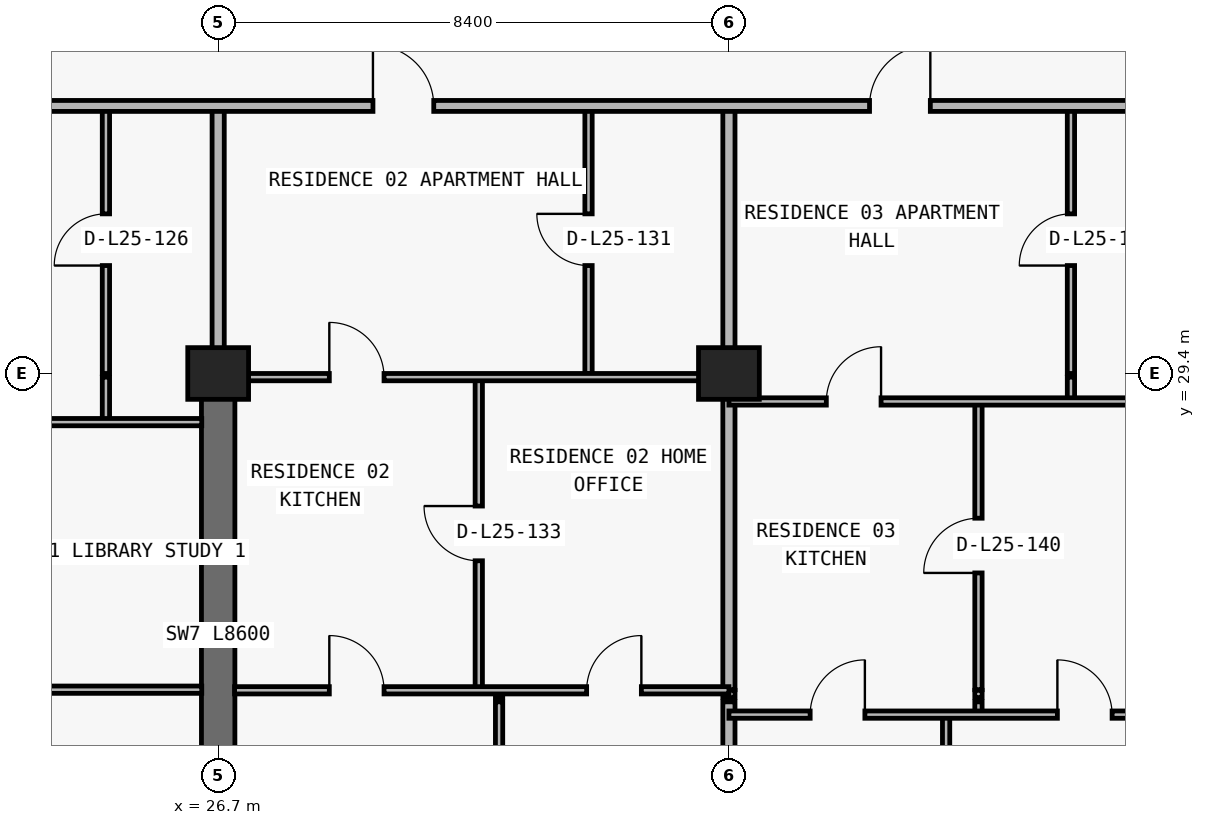
"""IFC4 building model, lengths in metres.
Left out: names, types, materials, properties, quantities, classifications, styles, units other than length and angle.
Written with IfcOpenShell. Run it as: python <this file> out.ifc"""

import sys

from ifc_helpers import new_model, si_unit, direction, frame, frame_2d, origin, origin_2d, place, context, subcontext, project, spatial, rectangle, extrude, element, fill, save


model = new_model("IFC4")
c1 = context("Model", 3, precision=1e-05, world=origin(), true_north=direction((0.0, 1.0)))
c2 = subcontext(c1, "Body", "Model", "MODEL_VIEW")
j1 = project(units=[si_unit("LENGTHUNIT", "METRE"), si_unit("PLANEANGLEUNIT", "RADIAN")], contexts=[c1])
p1 = place(None, origin())
s1 = spatial("IfcSite", under=j1, at=p1, CompositionType="ELEMENT")
p2 = place(p1, origin())
s2 = spatial("IfcBuilding", under=s1, at=p2, CompositionType="ELEMENT")
p3 = place(p2, frame((0.0, 0.0, 94.5)))
s3 = spatial("IfcBuildingStorey", under=s2, at=p3, CompositionType="ELEMENT", Elevation=94.5)
for number, where, z_axis, x_axis in (
    (1, (26.7, 29.4, 0.0), (0.0, 0.0, 1.0), (1.0, 0.0, 0.0)),
    (2, (35.1, 29.4, 0.0), (0.0, 0.0, 1.0), (1.0, 0.0, 0.0)),
):
    element("IfcColumn", number, at=place(p3, frame(where, z_axis=z_axis, x_axis=x_axis)), inside=s3, PredefinedType="COLUMN", context=c2, shape_type="SweptSolid", body=[
        extrude(rectangle(XDim=1.0, YDim=0.85, at=origin_2d()), origin(), (0.0, 0.0, 1.0), 3.0),
    ])
p4 = place(p3, frame((26.7, 20.8, 0.0), z_axis=(0.0, 0.0, 1.0), x_axis=(0.0, 1.0, 0.0)))
e3 = element("IfcWall", 3, at=p4, inside=s3, PredefinedType="SHEAR", context=c2, shape_type="SweptSolid", body=[
    extrude(rectangle(XDim=8.6, YDim=0.55, at=frame_2d((4.3, 0.0))), origin(), (0.0, 0.0, 1.0), 3.0),
])
p5 = place(p3, frame((24.854, 28.6, 0.0), z_axis=(0.0, 0.0, 1.0), x_axis=(0.0, 1.0, 0.0)))
e4 = element("IfcWall", 4, at=p5, inside=s3, PredefinedType="PARTITIONING", context=c2, shape_type="SweptSolid", body=[
    extrude(rectangle(XDim=0.74, YDim=0.12, at=frame_2d((0.37, 0.0))), origin(), (0.0, 0.0, 1.0), 2.629),
])
p6 = place(p3, frame((24.854, 29.4, 0.0), z_axis=(0.0, 0.0, 1.0), x_axis=(0.0, 1.0, 0.0)))
e5 = element("IfcWall", 5, at=p6, inside=s3, PredefinedType="PARTITIONING", context=c2, shape_type="SweptSolid", body=[
    extrude(rectangle(XDim=4.4, YDim=0.12, at=frame_2d((2.2, 0.0))), origin(), (0.0, 0.0, 1.0), 3.0),
])
p7 = place(p6, frame((1.775, 0.0, 0.0)))
e6 = element("IfcOpeningElement", 6, at=p7, cuts=e5, PredefinedType="OPENING", context=c2, shape_type="SweptSolid", body=[
    extrude(rectangle(XDim=0.85, YDim=2.1, at=frame_2d((0.425, 1.05))), frame((0.0, 0.07, 0.0), z_axis=(0.0, -1.0, 0.0), x_axis=(1.0, 0.0, 0.0)), (0.0, 0.0, 1.0), 0.14),
])
p8 = place(p3, frame((26.7, 29.405, 0.0), z_axis=(0.0, 0.0, 1.0), x_axis=(0.0, 1.0, 0.0)))
e7 = element("IfcWall", 7, at=p8, inside=s3, PredefinedType="PARTITIONING", context=c2, shape_type="SweptSolid", body=[
    extrude(rectangle(XDim=4.395, YDim=0.2, at=frame_2d((2.198, 0.0))), origin(), (0.0, 0.0, 1.0), 2.285),
])
p9 = place(p3, frame((30.986, 24.2, 0.0), z_axis=(0.0, 0.0, 1.0), x_axis=(0.0, 1.0, 0.0)))
e8 = element("IfcWall", 8, at=p9, inside=s3, PredefinedType="PARTITIONING", context=c2, shape_type="SweptSolid", body=[
    extrude(rectangle(XDim=5.14, YDim=0.12, at=frame_2d((2.57, 0.0))), origin(), (0.0, 0.0, 1.0), 2.436),
])
p10 = place(p9, frame((2.12, 0.0, 0.0)))
e9 = element("IfcOpeningElement", 9, at=p10, cuts=e8, PredefinedType="OPENING", context=c2, shape_type="SweptSolid", body=[
    extrude(rectangle(XDim=0.9, YDim=2.15, at=frame_2d((0.45, 1.075))), frame((0.0, 0.07, 0.0), z_axis=(0.0, -1.0, 0.0), x_axis=(1.0, 0.0, 0.0)), (0.0, 0.0, 1.0), 0.14),
])
p11 = place(p3, frame((31.32, 8.84, 0.0), z_axis=(0.0, 0.0, 1.0), x_axis=(0.0, 1.0, 0.0)))
e10 = element("IfcWall", 10, at=p11, inside=s3, PredefinedType="PARTITIONING", context=c2, shape_type="SweptSolid", body=[
    extrude(rectangle(XDim=15.16, YDim=0.12, at=frame_2d((7.58, 0.0))), origin(), (0.0, 0.0, 1.0), 3.0),
])
p12 = place(p3, frame((31.32, 24.07, 0.0), z_axis=(0.0, 0.0, 1.0), x_axis=(0.0, 1.0, 0.0)))
e11 = element("IfcWall", 11, at=p12, inside=s3, PredefinedType="PARTITIONING", context=c2, shape_type="SweptSolid", body=[
    extrude(rectangle(XDim=0.12, YDim=0.12, at=frame_2d((0.06, 0.0))), origin(), (0.0, 0.0, 1.0), 3.0),
])
p13 = place(p3, frame((32.791, 29.4, 0.0), z_axis=(0.0, 0.0, 1.0), x_axis=(0.0, 1.0, 0.0)))
e12 = element("IfcWall", 12, at=p13, inside=s3, PredefinedType="PARTITIONING", context=c2, shape_type="SweptSolid", body=[
    extrude(rectangle(XDim=4.4, YDim=0.12, at=frame_2d((2.2, 0.0))), origin(), (0.0, 0.0, 1.0), 3.0),
])
p14 = place(p13, frame((1.775, 0.0, 0.0)))
e13 = element("IfcOpeningElement", 13, at=p14, cuts=e12, PredefinedType="OPENING", context=c2, shape_type="SweptSolid", body=[
    extrude(rectangle(XDim=0.85, YDim=2.1, at=frame_2d((0.425, 1.05))), frame((0.0, 0.07, 0.0), z_axis=(0.0, -1.0, 0.0), x_axis=(1.0, 0.0, 0.0)), (0.0, 0.0, 1.0), 0.14),
])
p15 = place(p3, frame((35.1, 8.84, 0.0), z_axis=(0.0, 0.0, 1.0), x_axis=(0.0, 1.0, 0.0)))
e14 = element("IfcWall", 14, at=p15, inside=s3, PredefinedType="PARTITIONING", context=c2, shape_type="SweptSolid", body=[
    extrude(rectangle(XDim=15.16, YDim=0.2, at=frame_2d((7.58, 0.0))), origin(), (0.0, 0.0, 1.0), 2.124),
])
p16 = place(p3, frame((35.1, 24.07, 0.0), z_axis=(0.0, 0.0, 1.0), x_axis=(0.0, 1.0, 0.0)))
e15 = element("IfcWall", 15, at=p16, inside=s3, PredefinedType="PARTITIONING", context=c2, shape_type="SweptSolid", body=[
    extrude(rectangle(XDim=0.12, YDim=0.2, at=frame_2d((0.06, 0.0))), origin(), (0.0, 0.0, 1.0), 2.124),
])
p17 = place(p3, frame((35.1, 24.2, 0.0), z_axis=(0.0, 0.0, 1.0), x_axis=(0.0, 1.0, 0.0)))
e16 = element("IfcWall", 16, at=p17, inside=s3, PredefinedType="PARTITIONING", context=c2, shape_type="SweptSolid", body=[
    extrude(rectangle(XDim=5.14, YDim=0.2, at=frame_2d((2.57, 0.0))), origin(), (0.0, 0.0, 1.0), 2.124),
])
p18 = place(p3, frame((35.1, 29.4, 0.0), z_axis=(0.0, 0.0, 1.0), x_axis=(0.0, 1.0, 0.0)))
e17 = element("IfcWall", 17, at=p18, inside=s3, PredefinedType="PARTITIONING", context=c2, shape_type="SweptSolid", body=[
    extrude(rectangle(XDim=4.4, YDim=0.2, at=frame_2d((2.2, 0.0))), origin(), (0.0, 0.0, 1.0), 2.124),
])
p19 = place(p3, frame((38.672, 8.84, 0.0), z_axis=(0.0, 0.0, 1.0), x_axis=(0.0, 1.0, 0.0)))
e18 = element("IfcWall", 18, at=p19, inside=s3, PredefinedType="PARTITIONING", context=c2, shape_type="SweptSolid", body=[
    extrude(rectangle(XDim=14.95, YDim=0.12, at=frame_2d((7.475, 0.0))), origin(), (0.0, 0.0, 1.0), 2.436),
])
p20 = place(p3, frame((39.204, 23.79, 0.0), z_axis=(0.0, 0.0, 1.0), x_axis=(0.0, 1.0, 0.0)))
e19 = element("IfcWall", 19, at=p20, inside=s3, PredefinedType="PARTITIONING", context=c2, shape_type="SweptSolid", body=[
    extrude(rectangle(XDim=0.21, YDim=0.12, at=frame_2d((0.105, 0.0))), origin(), (0.0, 0.0, 1.0), 3.0),
])
p21 = place(p3, frame((39.204, 24.07, 0.0), z_axis=(0.0, 0.0, 1.0), x_axis=(0.0, 1.0, 0.0)))
e20 = element("IfcWall", 20, at=p21, inside=s3, PredefinedType="PARTITIONING", context=c2, shape_type="SweptSolid", body=[
    extrude(rectangle(XDim=0.12, YDim=0.12, at=frame_2d((0.06, 0.0))), origin(), (0.0, 0.0, 1.0), 3.0),
])
p22 = place(p3, frame((39.204, 24.2, 0.0), z_axis=(0.0, 0.0, 1.0), x_axis=(0.0, 1.0, 0.0)))
e21 = element("IfcWall", 21, at=p22, inside=s3, PredefinedType="PARTITIONING", context=c2, shape_type="SweptSolid", body=[
    extrude(rectangle(XDim=4.74, YDim=0.12, at=frame_2d((2.37, 0.0))), origin(), (0.0, 0.0, 1.0), 3.0),
])
p23 = place(p22, frame((1.92, 0.0, 0.0)))
e22 = element("IfcOpeningElement", 22, at=p23, cuts=e21, PredefinedType="OPENING", context=c2, shape_type="SweptSolid", body=[
    extrude(rectangle(XDim=0.9, YDim=2.15, at=frame_2d((0.45, 1.075))), frame((0.0, 0.07, 0.0), z_axis=(0.0, -1.0, 0.0), x_axis=(1.0, 0.0, 0.0)), (0.0, 0.0, 1.0), 0.14),
])
p24 = place(p3, frame((40.725, 28.94, 0.0), z_axis=(0.0, 0.0, 1.0), x_axis=(0.0, 1.0, 0.0)))
e23 = element("IfcWall", 23, at=p24, inside=s3, PredefinedType="PARTITIONING", context=c2, shape_type="SweptSolid", body=[
    extrude(rectangle(XDim=0.4, YDim=0.12, at=frame_2d((0.2, 0.0))), origin(), (0.0, 0.0, 1.0), 2.629),
])
p25 = place(p3, frame((40.725, 29.4, 0.0), z_axis=(0.0, 0.0, 1.0), x_axis=(0.0, 1.0, 0.0)))
e24 = element("IfcWall", 24, at=p25, inside=s3, PredefinedType="PARTITIONING", context=c2, shape_type="SweptSolid", body=[
    extrude(rectangle(XDim=4.4, YDim=0.12, at=frame_2d((2.2, 0.0))), origin(), (0.0, 0.0, 1.0), 3.0),
])
p26 = place(p25, frame((1.775, 0.0, 0.0)))
e25 = element("IfcOpeningElement", 25, at=p26, cuts=e24, PredefinedType="OPENING", context=c2, shape_type="SweptSolid", body=[
    extrude(rectangle(XDim=0.85, YDim=2.1, at=frame_2d((0.425, 1.05))), frame((0.0, 0.07, 0.0), z_axis=(0.0, -1.0, 0.0), x_axis=(1.0, 0.0, 0.0)), (0.0, 0.0, 1.0), 0.14),
])
p27 = place(p3, frame((35.1, 23.79, 0.0), z_axis=(0.0, 0.0, 1.0), x_axis=(1.0, 0.0, 0.0)))
e26 = element("IfcWall", 26, at=p27, inside=s3, PredefinedType="PARTITIONING", context=c2, shape_type="SweptSolid", body=[
    extrude(rectangle(XDim=7.6, YDim=0.12, at=frame_2d((3.8, 0.0))), origin(), (0.0, 0.0, 1.0), 3.0),
])
p28 = place(p27, frame((1.336, 0.0, 0.0)))
e27 = element("IfcOpeningElement", 27, at=p28, cuts=e26, PredefinedType="OPENING", context=c2, shape_type="SweptSolid", body=[
    extrude(rectangle(XDim=0.9, YDim=2.15, at=frame_2d((0.45, 1.075))), frame((0.0, 0.07, 0.0), z_axis=(0.0, -1.0, 0.0), x_axis=(1.0, 0.0, 0.0)), (0.0, 0.0, 1.0), 0.14),
])
p29 = place(p27, frame((5.402, 0.0, 0.0)))
e28 = element("IfcOpeningElement", 28, at=p29, cuts=e26, PredefinedType="OPENING", context=c2, shape_type="SweptSolid", body=[
    extrude(rectangle(XDim=0.9, YDim=2.15, at=frame_2d((0.45, 1.075))), frame((0.0, 0.07, 0.0), z_axis=(0.0, -1.0, 0.0), x_axis=(1.0, 0.0, 0.0)), (0.0, 0.0, 1.0), 0.14),
])
p30 = place(p3, frame((26.97, 24.19, 0.0), z_axis=(0.0, 0.0, 1.0), x_axis=(1.0, 0.0, 0.0)))
e29 = element("IfcWall", 29, at=p30, inside=s3, PredefinedType="PARTITIONING", context=c2, shape_type="SweptSolid", body=[
    extrude(rectangle(XDim=8.13, YDim=0.12, at=frame_2d((4.065, 0.0))), origin(), (0.0, 0.0, 1.0), 3.0),
])
p31 = place(p30, frame((1.558, 0.0, 0.0)))
e30 = element("IfcOpeningElement", 30, at=p31, cuts=e29, PredefinedType="OPENING", context=c2, shape_type="SweptSolid", body=[
    extrude(rectangle(XDim=0.9, YDim=2.15, at=frame_2d((0.45, 1.075))), frame((0.0, 0.07, 0.0), z_axis=(0.0, -1.0, 0.0), x_axis=(1.0, 0.0, 0.0)), (0.0, 0.0, 1.0), 0.14),
])
p32 = place(p30, frame((5.79, 0.0, 0.0)))
e31 = element("IfcOpeningElement", 31, at=p32, cuts=e29, PredefinedType="OPENING", context=c2, shape_type="SweptSolid", body=[
    extrude(rectangle(XDim=0.9, YDim=2.15, at=frame_2d((0.45, 1.075))), frame((0.0, 0.07, 0.0), z_axis=(0.0, -1.0, 0.0), x_axis=(1.0, 0.0, 0.0)), (0.0, 0.0, 1.0), 0.14),
])
p33 = place(p3, frame((18.3, 24.2, 0.0), z_axis=(0.0, 0.0, 1.0), x_axis=(1.0, 0.0, 0.0)))
e32 = element("IfcWall", 32, at=p33, inside=s3, PredefinedType="PARTITIONING", context=c2, shape_type="SweptSolid", body=[
    extrude(rectangle(XDim=8.13, YDim=0.12, at=frame_2d((4.065, 0.0))), origin(), (0.0, 0.0, 1.0), 3.0),
])
p34 = place(p33, frame((3.615, 0.0, 0.0)))
e33 = element("IfcOpeningElement", 33, at=p34, cuts=e32, PredefinedType="OPENING", context=c2, shape_type="SweptSolid", body=[
    extrude(rectangle(XDim=0.9, YDim=2.15, at=frame_2d((0.45, 1.075))), frame((0.0, 0.07, 0.0), z_axis=(0.0, -1.0, 0.0), x_axis=(1.0, 0.0, 0.0)), (0.0, 0.0, 1.0), 0.14),
])
p35 = place(p3, frame((18.3, 28.6, 0.0), z_axis=(0.0, 0.0, 1.0), x_axis=(1.0, 0.0, 0.0)))
e34 = element("IfcWall", 34, at=p35, inside=s3, PredefinedType="PARTITIONING", context=c2, shape_type="SweptSolid", body=[
    extrude(rectangle(XDim=8.13, YDim=0.12, at=frame_2d((4.065, 0.0))), origin(), (0.0, 0.0, 1.0), 3.0),
])
p36 = place(p35, frame((2.827, 0.0, 0.0)))
e35 = element("IfcOpeningElement", 35, at=p36, cuts=e34, PredefinedType="OPENING", context=c2, shape_type="SweptSolid", body=[
    extrude(rectangle(XDim=0.9, YDim=2.15, at=frame_2d((0.45, 1.075))), frame((0.0, 0.07, 0.0), z_axis=(0.0, -1.0, 0.0), x_axis=(1.0, 0.0, 0.0)), (0.0, 0.0, 1.0), 0.14),
])
p37 = place(p3, frame((35.1, 28.94, 0.0), z_axis=(0.0, 0.0, 1.0), x_axis=(1.0, 0.0, 0.0)))
e36 = element("IfcWall", 36, at=p37, inside=s3, PredefinedType="PARTITIONING", context=c2, shape_type="SweptSolid", body=[
    extrude(rectangle(XDim=7.6, YDim=0.12, at=frame_2d((3.8, 0.0))), origin(), (0.0, 0.0, 1.0), 3.0),
])
p38 = place(p37, frame((1.602, 0.0, 0.0)))
e37 = element("IfcOpeningElement", 37, at=p38, cuts=e36, PredefinedType="OPENING", context=c2, shape_type="SweptSolid", body=[
    extrude(rectangle(XDim=0.9, YDim=2.15, at=frame_2d((0.45, 1.075))), frame((0.0, 0.07, 0.0), z_axis=(0.0, -1.0, 0.0), x_axis=(1.0, 0.0, 0.0)), (0.0, 0.0, 1.0), 0.14),
])
p39 = place(p3, frame((26.97, 29.34, 0.0), z_axis=(0.0, 0.0, 1.0), x_axis=(1.0, 0.0, 0.0)))
e38 = element("IfcWall", 38, at=p39, inside=s3, PredefinedType="PARTITIONING", context=c2, shape_type="SweptSolid", body=[
    extrude(rectangle(XDim=8.13, YDim=0.12, at=frame_2d((4.065, 0.0))), origin(), (0.0, 0.0, 1.0), 2.124),
])
p40 = place(p39, frame((1.558, 0.0, 0.0)))
e39 = element("IfcOpeningElement", 39, at=p40, cuts=e38, PredefinedType="OPENING", context=c2, shape_type="SweptSolid", body=[
    extrude(rectangle(XDim=0.9, YDim=2.074, at=frame_2d((0.45, 1.037))), frame((0.0, 0.07, 0.0), z_axis=(0.0, -1.0, 0.0), x_axis=(1.0, 0.0, 0.0)), (0.0, 0.0, 1.0), 0.14),
])
p41 = place(p3, frame((18.3, 33.8, 0.0), z_axis=(0.0, 0.0, 1.0), x_axis=(1.0, 0.0, 0.0)))
e40 = element("IfcWall", 40, at=p41, inside=s3, PredefinedType="PARTITIONING", context=c2, shape_type="SweptSolid", body=[
    extrude(rectangle(XDim=41.2, YDim=0.18, at=frame_2d((20.6, 0.0))), origin(), (0.0, 0.0, 1.0), 3.0),
])
p42 = place(p41, frame((10.946, 0.0, 0.0)))
e41 = element("IfcOpeningElement", 41, at=p42, cuts=e40, PredefinedType="OPENING", context=c2, shape_type="SweptSolid", body=[
    extrude(rectangle(XDim=1.0, YDim=2.2, at=frame_2d((0.5, 1.1))), frame((0.0, 0.1, 0.0), z_axis=(0.0, -1.0, 0.0), x_axis=(1.0, 0.0, 0.0)), (0.0, 0.0, 1.0), 0.2),
])
p43 = place(p41, frame((19.113, 0.0, 0.0)))
e42 = element("IfcOpeningElement", 42, at=p43, cuts=e40, PredefinedType="OPENING", context=c2, shape_type="SweptSolid", body=[
    extrude(rectangle(XDim=1.0, YDim=2.2, at=frame_2d((0.5, 1.1))), frame((0.0, 0.1, 0.0), z_axis=(0.0, -1.0, 0.0), x_axis=(1.0, 0.0, 0.0)), (0.0, 0.0, 1.0), 0.2),
])
p44 = place(p41, frame((26.976, 0.0, 0.0)))
e43 = element("IfcOpeningElement", 43, at=p44, cuts=e40, PredefinedType="OPENING", context=c2, shape_type="SweptSolid", body=[
    extrude(rectangle(XDim=1.0, YDim=2.2, at=frame_2d((0.5, 1.1))), frame((0.0, 0.1, 0.0), z_axis=(0.0, -1.0, 0.0), x_axis=(1.0, 0.0, 0.0)), (0.0, 0.0, 1.0), 0.2),
])
p45 = place(p41, frame((35.47, 0.0, 0.0)))
e44 = element("IfcOpeningElement", 44, at=p45, cuts=e40, PredefinedType="OPENING", context=c2, shape_type="SweptSolid", body=[
    extrude(rectangle(XDim=1.0, YDim=2.2, at=frame_2d((0.5, 1.1))), frame((0.0, 0.1, 0.0), z_axis=(0.0, -1.0, 0.0), x_axis=(1.0, 0.0, 0.0)), (0.0, 0.0, 1.0), 0.2),
])
p46 = place(p7, origin())
e45 = element("IfcDoor", 45, at=p46, inside=s3, OperationType="SINGLE_SWING_LEFT", PredefinedType="DOOR", context=c2, shape_type="SweptSolid", body=[
    extrude(rectangle(XDim=0.85, YDim=2.1, at=frame_2d((0.425, 1.05))), frame((0.0, 0.025, 0.0), z_axis=(0.0, -1.0, 0.0), x_axis=(1.0, 0.0, 0.0)), (0.0, 0.0, 1.0), 0.05),
])
fill(e6, e45)
p47 = place(p42, origin())
e46 = element("IfcDoor", 46, at=p47, inside=s3, OperationType="SINGLE_SWING_LEFT", PredefinedType="DOOR", context=c2, shape_type="SweptSolid", body=[
    extrude(rectangle(XDim=1.0, YDim=2.2, at=frame_2d((0.5, 1.1))), frame((0.0, 0.025, 0.0), z_axis=(0.0, -1.0, 0.0), x_axis=(1.0, 0.0, 0.0)), (0.0, 0.0, 1.0), 0.05),
])
fill(e41, e46)
p48 = place(p14, origin())
e47 = element("IfcDoor", 47, at=p48, inside=s3, OperationType="SINGLE_SWING_RIGHT", PredefinedType="DOOR", context=c2, shape_type="SweptSolid", body=[
    extrude(rectangle(XDim=0.85, YDim=2.1, at=frame_2d((0.425, 1.05))), frame((0.0, 0.025, 0.0), z_axis=(0.0, -1.0, 0.0), x_axis=(1.0, 0.0, 0.0)), (0.0, 0.0, 1.0), 0.05),
])
fill(e13, e47)
p49 = place(p40, origin())
e48 = element("IfcDoor", 48, at=p49, inside=s3, OperationType="SINGLE_SWING_LEFT", PredefinedType="DOOR", context=c2, shape_type="SweptSolid", body=[
    extrude(rectangle(XDim=0.9, YDim=2.074, at=frame_2d((0.45, 1.037))), frame((0.0, 0.025, 0.0), z_axis=(0.0, -1.0, 0.0), x_axis=(1.0, 0.0, 0.0)), (0.0, 0.0, 1.0), 0.05),
])
fill(e39, e48)
p50 = place(p10, origin())
e49 = element("IfcDoor", 49, at=p50, inside=s3, OperationType="SINGLE_SWING_RIGHT", PredefinedType="DOOR", context=c2, shape_type="SweptSolid", body=[
    extrude(rectangle(XDim=0.9, YDim=2.15, at=frame_2d((0.45, 1.075))), frame((0.0, 0.025, 0.0), z_axis=(0.0, -1.0, 0.0), x_axis=(1.0, 0.0, 0.0)), (0.0, 0.0, 1.0), 0.05),
])
fill(e9, e49)
p51 = place(p31, origin())
e50 = element("IfcDoor", 50, at=p51, inside=s3, OperationType="SINGLE_SWING_LEFT", PredefinedType="DOOR", context=c2, shape_type="SweptSolid", body=[
    extrude(rectangle(XDim=0.9, YDim=2.15, at=frame_2d((0.45, 1.075))), frame((0.0, 0.025, 0.0), z_axis=(0.0, -1.0, 0.0), x_axis=(1.0, 0.0, 0.0)), (0.0, 0.0, 1.0), 0.05),
])
fill(e30, e50)
p52 = place(p32, origin())
e51 = element("IfcDoor", 51, at=p52, inside=s3, OperationType="SINGLE_SWING_RIGHT", PredefinedType="DOOR", context=c2, shape_type="SweptSolid", body=[
    extrude(rectangle(XDim=0.9, YDim=2.15, at=frame_2d((0.45, 1.075))), frame((0.0, 0.025, 0.0), z_axis=(0.0, -1.0, 0.0), x_axis=(1.0, 0.0, 0.0)), (0.0, 0.0, 1.0), 0.05),
])
fill(e31, e51)
p53 = place(p43, origin())
e52 = element("IfcDoor", 52, at=p53, inside=s3, OperationType="SINGLE_SWING_RIGHT", PredefinedType="DOOR", context=c2, shape_type="SweptSolid", body=[
    extrude(rectangle(XDim=1.0, YDim=2.2, at=frame_2d((0.5, 1.1))), frame((0.0, 0.025, 0.0), z_axis=(0.0, -1.0, 0.0), x_axis=(1.0, 0.0, 0.0)), (0.0, 0.0, 1.0), 0.05),
])
fill(e42, e52)
p54 = place(p26, origin())
e53 = element("IfcDoor", 53, at=p54, inside=s3, OperationType="SINGLE_SWING_LEFT", PredefinedType="DOOR", context=c2, shape_type="SweptSolid", body=[
    extrude(rectangle(XDim=0.85, YDim=2.1, at=frame_2d((0.425, 1.05))), frame((0.0, 0.025, 0.0), z_axis=(0.0, -1.0, 0.0), x_axis=(1.0, 0.0, 0.0)), (0.0, 0.0, 1.0), 0.05),
])
fill(e25, e53)
p55 = place(p38, origin())
e54 = element("IfcDoor", 54, at=p55, inside=s3, OperationType="SINGLE_SWING_RIGHT", PredefinedType="DOOR", context=c2, shape_type="SweptSolid", body=[
    extrude(rectangle(XDim=0.9, YDim=2.15, at=frame_2d((0.45, 1.075))), frame((0.0, 0.025, 0.0), z_axis=(0.0, -1.0, 0.0), x_axis=(1.0, 0.0, 0.0)), (0.0, 0.0, 1.0), 0.05),
])
fill(e37, e54)
p56 = place(p23, origin())
e55 = element("IfcDoor", 55, at=p56, inside=s3, OperationType="SINGLE_SWING_LEFT", PredefinedType="DOOR", context=c2, shape_type="SweptSolid", body=[
    extrude(rectangle(XDim=0.9, YDim=2.15, at=frame_2d((0.45, 1.075))), frame((0.0, 0.025, 0.0), z_axis=(0.0, -1.0, 0.0), x_axis=(1.0, 0.0, 0.0)), (0.0, 0.0, 1.0), 0.05),
])
fill(e22, e55)
p57 = place(p28, origin())
e56 = element("IfcDoor", 56, at=p57, inside=s3, OperationType="SINGLE_SWING_RIGHT", PredefinedType="DOOR", context=c2, shape_type="SweptSolid", body=[
    extrude(rectangle(XDim=0.9, YDim=2.15, at=frame_2d((0.45, 1.075))), frame((0.0, 0.025, 0.0), z_axis=(0.0, -1.0, 0.0), x_axis=(1.0, 0.0, 0.0)), (0.0, 0.0, 1.0), 0.05),
])
fill(e27, e56)
p58 = place(p29, origin())
e57 = element("IfcDoor", 57, at=p58, inside=s3, OperationType="SINGLE_SWING_LEFT", PredefinedType="DOOR", context=c2, shape_type="SweptSolid", body=[
    extrude(rectangle(XDim=0.9, YDim=2.15, at=frame_2d((0.45, 1.075))), frame((0.0, 0.025, 0.0), z_axis=(0.0, -1.0, 0.0), x_axis=(1.0, 0.0, 0.0)), (0.0, 0.0, 1.0), 0.05),
])
fill(e28, e57)
save(model, sys.argv[1])
